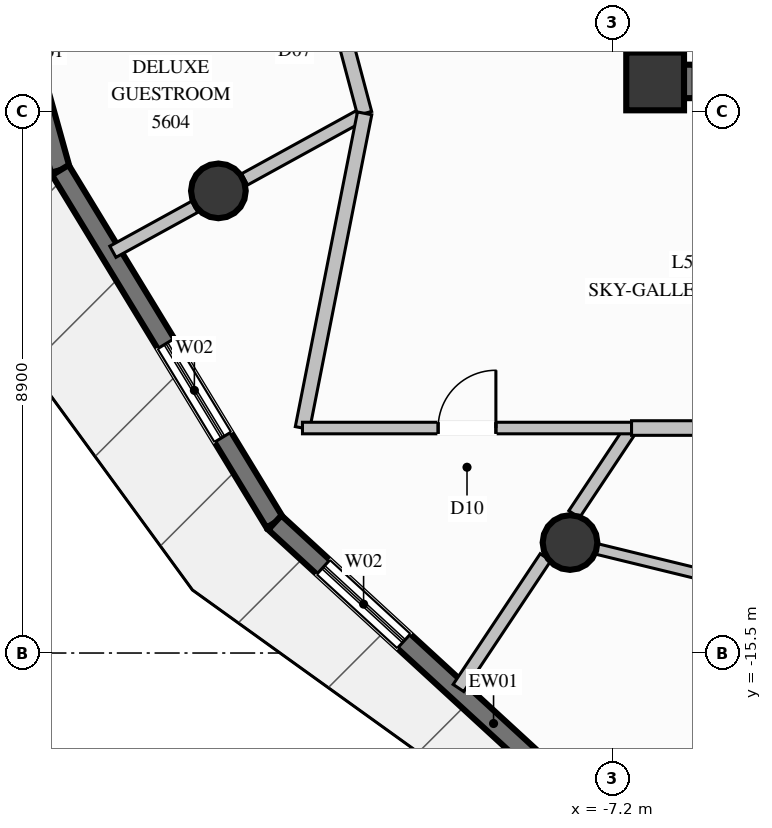
"""IFC4 building model, lengths in metres.
Left out: names, types, materials, properties, quantities, classifications, styles, units other than length and angle.
Written with IfcOpenShell. Run it as: python <this file> out.ifc"""

import sys

from ifc_helpers import new_model, si_unit, direction, frame, frame_2d, origin, origin_2d, place, context, subcontext, project, spatial, rectangle, circle, extrude, element, fill, save


model = new_model("IFC4")
c1 = context("Model", 3, precision=1e-05, world=origin(), true_north=direction((0.0, 1.0)))
c2 = subcontext(c1, "Body", "Model", "MODEL_VIEW")
j1 = project(units=[si_unit("LENGTHUNIT", "METRE"), si_unit("PLANEANGLEUNIT", "RADIAN")], contexts=[c1])
p1 = place(None, origin())
s1 = spatial("IfcSite", under=j1, at=p1, CompositionType="ELEMENT")
p2 = place(p1, origin())
s2 = spatial("IfcBuilding", under=s1, at=p2, CompositionType="ELEMENT")
p3 = place(p2, frame((0.0, 0.0, 209.2)))
s3 = spatial("IfcBuildingStorey", under=s2, at=p3, CompositionType="ELEMENT", Elevation=209.2)
p4 = place(p3, frame((-6.5, -6.1, 0.0), z_axis=(0.0, 0.0, 1.0), x_axis=(1.0, 0.0, 0.0)))
e1 = element("IfcColumn", 1, at=p4, inside=s3, PredefinedType="COLUMN", context=c2, shape_type="SweptSolid", body=[
    extrude(rectangle(XDim=0.95, YDim=0.95, at=origin_2d()), origin(), (0.0, 0.0, 1.0), 3.6),
])
p5 = place(p3, frame((-6.225, -6.1, 0.0), z_axis=(0.0, 0.0, 1.0), x_axis=(1.0, 0.0, 0.0)))
e2 = element("IfcWall", 2, at=p5, inside=s3, PredefinedType="SHEAR", context=c2, shape_type="SweptSolid", body=[
    extrude(rectangle(XDim=0.375, YDim=0.55, at=frame_2d((0.188, 0.0))), origin(), (0.0, 0.0, 1.0), 3.6),
])
p6 = place(p3, frame((-6.5, -6.375, 0.0), z_axis=(0.0, 0.0, 1.0), x_axis=(0.0, 1.0, 0.0)))
e3 = element("IfcWall", 3, at=p6, inside=s3, PredefinedType="SHEAR", context=c2, shape_type="SweptSolid", body=[
    extrude(rectangle(XDim=3.025, YDim=0.55, at=frame_2d((1.512, 0.0))), origin(), (0.0, 0.0, 1.0), 3.6),
])
for number, where, z_axis, x_axis in (
    (4, (-13.683, -7.9, 0.0), (0.0, 0.0, 1.0), (1.0, 0.0, 0.0)),
    (5, (-7.9, -13.683, 0.0), (0.0, 0.0, 1.0), (1.0, 0.0, 0.0)),
):
    element("IfcColumn", number, at=place(p3, frame(where, z_axis=z_axis, x_axis=x_axis)), inside=s3, PredefinedType="COLUMN", context=c2, shape_type="SweptSolid", body=[
        extrude(circle(Radius=0.45, at=origin_2d()), origin(), (0.0, 0.0, 1.0), 3.6),
    ])
p7 = place(p3, frame((-16.282, -7.558, 0.0), z_axis=(0.0, 0.0, 1.0), x_axis=(-0.268256249254, 0.963347592895, 0.0)))
e6 = element("IfcWall", 6, at=p7, inside=s3, PredefinedType="SOLIDWALL", context=c2, shape_type="SweptSolid", body=[
    extrude(rectangle(XDim=6.785, YDim=0.32, at=frame_2d((3.393, 0.0))), origin(), (0.0, 0.0, 1.0), 3.36),
])
p8 = place(p7, frame((4.488, 0.0, 0.35)))
e7 = element("IfcOpeningElement", 7, at=p8, cuts=e6, PredefinedType="OPENING", context=c2, shape_type="SweptSolid", body=[
    extrude(rectangle(XDim=1.8, YDim=2.6, at=frame_2d((0.9, 1.3))), frame((0.0, 0.17, 0.0), z_axis=(0.0, -1.0, 0.0), x_axis=(1.0, 0.0, 0.0)), (0.0, 0.0, 1.0), 0.34),
])
p9 = place(p7, frame((2.842, 0.0, 0.0)))
e8 = element("IfcOpeningElement", 8, at=p9, cuts=e6, PredefinedType="OPENING", context=c2, shape_type="SweptSolid", body=[
    extrude(rectangle(XDim=1.1, YDim=2.2, at=frame_2d((0.55, 1.1))), frame((0.0, 0.17, 0.0), z_axis=(0.0, -1.0, 0.0), x_axis=(1.0, 0.0, 0.0)), (0.0, 0.0, 1.0), 0.34),
])
p10 = place(p3, frame((-12.755, -13.355, 0.0), z_axis=(0.0, 0.0, 1.0), x_axis=(-0.519792847808, 0.854292336011, 0.0)))
e9 = element("IfcWall", 9, at=p10, inside=s3, PredefinedType="SOLIDWALL", context=c2, shape_type="SweptSolid", body=[
    extrude(rectangle(XDim=6.786, YDim=0.32, at=frame_2d((3.393, 0.0))), origin(), (0.0, 0.0, 1.0), 3.36),
])
p11 = place(p10, frame((1.645, 0.0, 0.35)))
e10 = element("IfcOpeningElement", 10, at=p11, cuts=e9, PredefinedType="OPENING", context=c2, shape_type="SweptSolid", body=[
    extrude(rectangle(XDim=1.8, YDim=2.6, at=frame_2d((0.9, 1.3))), frame((0.0, 0.17, 0.0), z_axis=(0.0, -1.0, 0.0), x_axis=(1.0, 0.0, 0.0)), (0.0, 0.0, 1.0), 0.34),
])
p12 = place(p3, frame((-7.867, -17.844, 0.0), z_axis=(0.0, 0.0, 1.0), x_axis=(-0.736523155924, 0.676412330452, 0.0)))
e11 = element("IfcWall", 11, at=p12, inside=s3, PredefinedType="SOLIDWALL", context=c2, shape_type="SweptSolid", body=[
    extrude(rectangle(XDim=6.636, YDim=0.32, at=frame_2d((3.318, 0.0))), origin(), (0.0, 0.0, 1.0), 3.36),
])
p13 = place(p12, frame((3.754, 0.0, 0.35)))
e12 = element("IfcOpeningElement", 12, at=p13, cuts=e11, PredefinedType="OPENING", context=c2, shape_type="SweptSolid", body=[
    extrude(rectangle(XDim=1.8, YDim=2.6, at=frame_2d((0.9, 1.3))), frame((0.0, 0.17, 0.0), z_axis=(0.0, -1.0, 0.0), x_axis=(1.0, 0.0, 0.0)), (0.0, 0.0, 1.0), 0.34),
])
p14 = place(p3, frame((-11.278, -6.625, 0.0), z_axis=(0.0, 0.0, 1.0), x_axis=(-0.876259360779, -0.481839737513, 0.0)))
e13 = element("IfcWall", 13, at=p14, inside=s3, PredefinedType="PARTITIONING", context=c2, shape_type="SweptSolid", body=[
    extrude(rectangle(XDim=2.254, YDim=0.21, at=frame_2d((1.127, 0.0))), origin(), (0.0, 0.0, 1.0), 2.801),
])
p15 = place(p3, frame((-14.073, -8.162, 0.0), z_axis=(0.0, 0.0, 1.0), x_axis=(-0.876481145855, -0.481436185761, 0.0)))
e14 = element("IfcWall", 14, at=p15, inside=s3, PredefinedType="PARTITIONING", context=c2, shape_type="SweptSolid", body=[
    extrude(rectangle(XDim=1.534, YDim=0.21, at=frame_2d((0.767, 0.0))), origin(), (0.0, 0.0, 1.0), 3.36),
])
p16 = place(p3, frame((-12.277, -2.869, 0.0), z_axis=(0.0, 0.0, 1.0), x_axis=(0.257037057674, -0.966401547486, 0.0)))
e15 = element("IfcWall", 15, at=p16, inside=s3, PredefinedType="PARTITIONING", context=c2, shape_type="SweptSolid", body=[
    extrude(rectangle(XDim=3.887, YDim=0.24, at=frame_2d((1.943, 0.0))), origin(), (0.0, 0.0, 1.0), 3.36),
])
p17 = place(p16, frame((1.443, 0.0, 0.0)))
e16 = element("IfcOpeningElement", 16, at=p17, cuts=e15, PredefinedType="OPENING", context=c2, shape_type="SweptSolid", body=[
    extrude(rectangle(XDim=1.0, YDim=2.2, at=frame_2d((0.5, 1.1))), frame((0.0, 0.13, 0.0), z_axis=(0.0, -1.0, 0.0), x_axis=(1.0, 0.0, 0.0)), (0.0, 0.0, 1.0), 0.26),
])
p18 = place(p3, frame((-6.888, -11.8, 0.0), z_axis=(0.0, 0.0, 1.0), x_axis=(-0.55420400286, -0.83238087629, 0.0)))
e17 = element("IfcWall", 17, at=p18, inside=s3, PredefinedType="PARTITIONING", context=c2, shape_type="SweptSolid", body=[
    extrude(rectangle(XDim=1.704, YDim=0.21, at=frame_2d((0.852, 0.0))), origin(), (0.0, 0.0, 1.0), 2.801),
])
p19 = place(p3, frame((-8.303, -13.925, 0.0), z_axis=(0.0, 0.0, 1.0), x_axis=(-0.554394819338, -0.832253798004, 0.0)))
e18 = element("IfcWall", 18, at=p19, inside=s3, PredefinedType="PARTITIONING", context=c2, shape_type="SweptSolid", body=[
    extrude(rectangle(XDim=2.583, YDim=0.21, at=frame_2d((1.292, 0.0))), origin(), (0.0, 0.0, 1.0), 3.36),
])
p20 = place(p3, frame((-11.278, -6.625, 0.0), z_axis=(0.0, 0.0, 1.0), x_axis=(-0.193739123744, -0.981053083136, 0.0)))
e19 = element("IfcWall", 19, at=p20, inside=s3, PredefinedType="PARTITIONING", context=c2, shape_type="SweptSolid", body=[
    extrude(rectangle(XDim=5.275, YDim=0.24, at=frame_2d((2.637, 0.0))), origin(), (0.0, 0.0, 1.0), 3.36),
])
p21 = place(p3, frame((-12.3, -11.8, 0.0), z_axis=(0.0, 0.0, 1.0), x_axis=(1.0, 0.0, 0.0)))
e20 = element("IfcWall", 20, at=p21, inside=s3, PredefinedType="PARTITIONING", context=c2, shape_type="SweptSolid", body=[
    extrude(rectangle(XDim=5.412, YDim=0.19, at=frame_2d((2.706, 0.0))), origin(), (0.0, 0.0, 1.0), 3.36),
])
p22 = place(p21, frame((2.231, 0.0, 0.0)))
e21 = element("IfcOpeningElement", 21, at=p22, cuts=e20, PredefinedType="OPENING", context=c2, shape_type="SweptSolid", body=[
    extrude(rectangle(XDim=0.95, YDim=2.1, at=frame_2d((0.475, 1.05))), frame((0.0, 0.105, 0.0), z_axis=(0.0, -1.0, 0.0), x_axis=(1.0, 0.0, 0.0)), (0.0, 0.0, 1.0), 0.21),
])
p23 = place(p3, frame((-6.888, -11.8, 0.0), z_axis=(0.0, 0.0, 1.0), x_axis=(1.0, 0.0, 0.0)))
e22 = element("IfcWall", 22, at=p23, inside=s3, PredefinedType="PARTITIONING", context=c2, shape_type="SweptSolid", body=[
    extrude(rectangle(XDim=3.031, YDim=0.24, at=frame_2d((1.516, 0.0))), origin(), (0.0, 0.0, 1.0), 3.36),
])
p24 = place(p3, frame((-8.107, -13.631, 0.0), z_axis=(0.0, 0.0, 1.0), x_axis=(0.971539249473, -0.236878632918, 0.0)))
e23 = element("IfcWall", 23, at=p24, inside=s3, PredefinedType="PLUMBINGWALL", context=c2, shape_type="SweptSolid", body=[
    extrude(rectangle(XDim=3.841, YDim=0.175, at=frame_2d((1.921, 0.0))), origin(), (0.0, 0.0, 1.0), 2.929),
])
p25 = place(p11, origin())
e24 = element("IfcWindow", 24, at=p25, inside=s3, PartitioningType="SINGLE_PANEL", PredefinedType="WINDOW", context=c2, shape_type="SweptSolid", body=[
    extrude(rectangle(XDim=1.8, YDim=2.6, at=frame_2d((0.9, 1.3))), frame((0.0, 0.03, 0.0), z_axis=(0.0, -1.0, 0.0), x_axis=(1.0, 0.0, 0.0)), (0.0, 0.0, 1.0), 0.06),
])
fill(e10, e24)
p26 = place(p13, origin())
e25 = element("IfcWindow", 25, at=p26, inside=s3, PartitioningType="SINGLE_PANEL", PredefinedType="WINDOW", context=c2, shape_type="SweptSolid", body=[
    extrude(rectangle(XDim=1.8, YDim=2.6, at=frame_2d((0.9, 1.3))), frame((0.0, 0.03, 0.0), z_axis=(0.0, -1.0, 0.0), x_axis=(1.0, 0.0, 0.0)), (0.0, 0.0, 1.0), 0.06),
])
fill(e12, e25)
p27 = place(p22, origin())
e26 = element("IfcDoor", 26, at=p27, inside=s3, OperationType="SINGLE_SWING_RIGHT", PredefinedType="DOOR", context=c2, shape_type="SweptSolid", body=[
    extrude(rectangle(XDim=0.95, YDim=2.1, at=frame_2d((0.475, 1.05))), frame((0.0, 0.025, 0.0), z_axis=(0.0, -1.0, 0.0), x_axis=(1.0, 0.0, 0.0)), (0.0, 0.0, 1.0), 0.05),
])
fill(e21, e26)
save(model, sys.argv[1])
